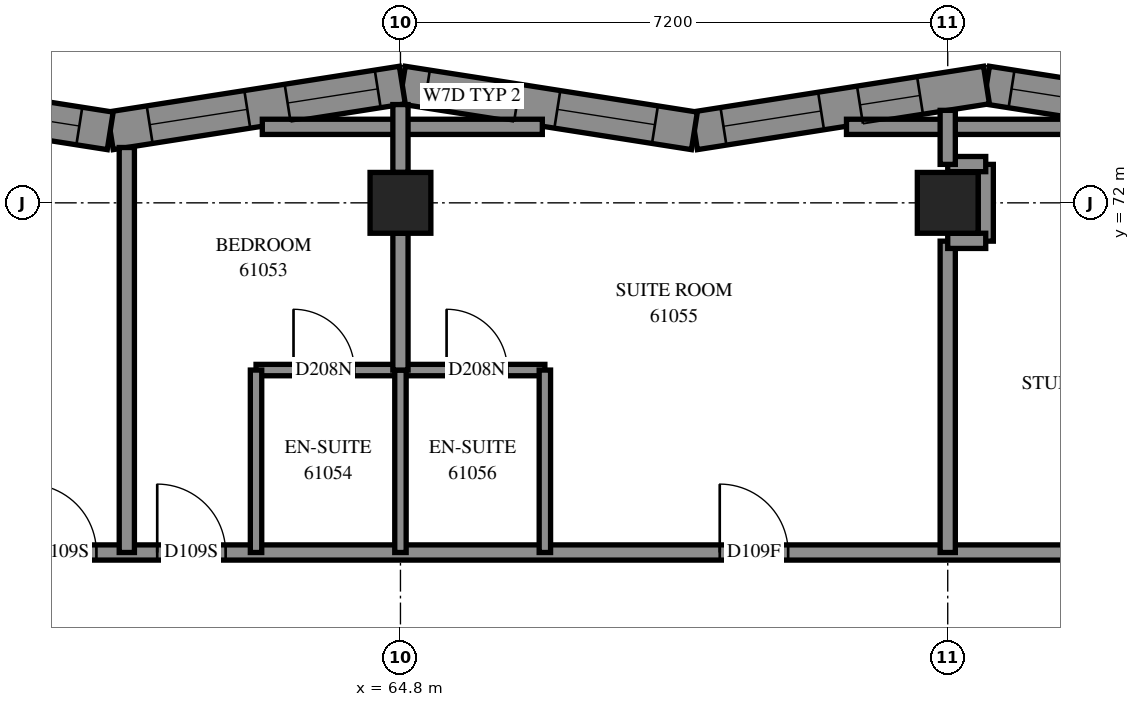
"""IFC4 building model, lengths in metres.
Left out: names, types, materials, properties, quantities, classifications, styles, units other than length and angle.
Written with IfcOpenShell. Run it as: python <this file> out.ifc"""

import sys

from ifc_helpers import new_model, si_unit, direction, frame, frame_2d, origin, origin_2d, place, context, subcontext, project, spatial, polyline, rectangle, outline, extrude, element, fill, save


model = new_model("IFC4")
c1 = context("Model", 3, precision=1e-05, world=origin(), true_north=direction((0.0, 1.0)))
c2 = subcontext(c1, "Body", "Model", "MODEL_VIEW")
j1 = project(units=[si_unit("LENGTHUNIT", "METRE"), si_unit("PLANEANGLEUNIT", "RADIAN")], contexts=[c1])
p1 = place(None, origin())
s1 = spatial("IfcSite", under=j1, at=p1, CompositionType="ELEMENT")
p2 = place(p1, origin())
s2 = spatial("IfcBuilding", under=s1, at=p2, CompositionType="ELEMENT")
p3 = place(p2, frame((0.0, 0.0, 223.6)))
s3 = spatial("IfcBuildingStorey", under=s2, at=p3, CompositionType="ELEMENT", Elevation=223.6)
for number, where, z_axis, x_axis in (
    (1, (64.8, 72.0, 0.0), (0.0, 0.0, 1.0), (1.0, 0.0, 0.0)),
    (2, (72.0, 72.0, 0.0), (0.0, 0.0, 1.0), (1.0, 0.0, 0.0)),
):
    element("IfcColumn", number, at=place(p3, frame(where, z_axis=z_axis, x_axis=x_axis)), inside=s3, PredefinedType="COLUMN", context=c2, shape_type="SweptSolid", body=[
        extrude(rectangle(XDim=0.8, YDim=0.8, at=origin_2d()), origin(), (0.0, 0.0, 1.0), 3.1),
    ])
p4 = place(p3, frame((76.372, 72.944, 0.0), z_axis=(0.0, 0.0, 1.0), x_axis=(-0.9879139197, 0.1550035072, 0.0)))
e3 = element("IfcWall", 3, at=p4, inside=s3, PredefinedType="SOLIDWALL", context=c2, shape_type="SweptSolid", body=[
    extrude(outline(polyline([(0.058, -0.25), (3.948, -0.25), (3.87, 0.25), (-0.058, 0.25), (0.058, -0.25)])), origin(), (0.0, 0.0, 1.0), 3.1),
])
p5 = place(p4, frame((2.375, 0.0, 0.45)))
e4 = element("IfcOpeningElement", 4, at=p5, cuts=e3, PredefinedType="OPENING", context=c2, shape_type="SweptSolid", body=[
    extrude(rectangle(XDim=1.2, YDim=2.5, at=frame_2d((0.6, 1.25))), frame((0.0, 0.26, 0.0), z_axis=(0.0, -1.0, 0.0), x_axis=(1.0, 0.0, 0.0)), (0.0, 0.0, 1.0), 0.52),
])
p6 = place(p3, frame((72.51, 73.55, 0.0), z_axis=(0.0, 0.0, 1.0), x_axis=(-0.9879107269, -0.1550238552, 0.0)))
e5 = element("IfcWall", 5, at=p6, inside=s3, PredefinedType="SOLIDWALL", context=c2, shape_type="SweptSolid", body=[
    extrude(outline(polyline([(-0.039, -0.25), (3.85, -0.25), (3.929, 0.25), (0.039, 0.25), (-0.039, -0.25)])), origin(), (0.0, 0.0, 1.0), 3.1),
])
p7 = place(p6, frame((2.203, 0.0, 0.45)))
e6 = element("IfcOpeningElement", 6, at=p7, cuts=e5, PredefinedType="OPENING", context=c2, shape_type="SweptSolid", body=[
    extrude(rectangle(XDim=1.3, YDim=2.5, at=frame_2d((0.65, 1.25))), frame((0.0, 0.26, 0.0), z_axis=(0.0, -1.0, 0.0), x_axis=(1.0, 0.0, 0.0)), (0.0, 0.0, 1.0), 0.52),
])
p8 = place(p6, frame((0.885, 0.0, 0.45)))
e7 = element("IfcOpeningElement", 7, at=p8, cuts=e5, PredefinedType="OPENING", context=c2, shape_type="SweptSolid", body=[
    extrude(rectangle(XDim=0.8, YDim=2.5, at=frame_2d((0.4, 1.25))), frame((0.0, 0.26, 0.0), z_axis=(0.0, -1.0, 0.0), x_axis=(1.0, 0.0, 0.0)), (0.0, 0.0, 1.0), 0.52),
])
p9 = place(p3, frame((68.667, 72.947, 0.0), z_axis=(0.0, 0.0, 1.0), x_axis=(-0.9879113447, 0.155019918, 0.0)))
e8 = element("IfcWall", 8, at=p9, inside=s3, PredefinedType="SOLIDWALL", context=c2, shape_type="SweptSolid", body=[
    extrude(outline(polyline([(0.039, -0.25), (3.929, -0.25), (3.85, 0.25), (-0.039, 0.25), (0.039, -0.25)])), origin(), (0.0, 0.0, 1.0), 3.1),
])
p10 = place(p9, frame((0.525, 0.0, 0.45)))
e9 = element("IfcOpeningElement", 9, at=p10, cuts=e8, PredefinedType="OPENING", context=c2, shape_type="SweptSolid", body=[
    extrude(rectangle(XDim=1.3, YDim=2.5, at=frame_2d((0.65, 1.25))), frame((0.0, 0.26, 0.0), z_axis=(0.0, -1.0, 0.0), x_axis=(1.0, 0.0, 0.0)), (0.0, 0.0, 1.0), 0.52),
])
p11 = place(p9, frame((2.362, 0.0, 0.5)))
e10 = element("IfcOpeningElement", 10, at=p11, cuts=e8, PredefinedType="OPENING", context=c2, shape_type="SweptSolid", body=[
    extrude(rectangle(XDim=1.2, YDim=2.45, at=frame_2d((0.6, 1.225))), frame((0.0, 0.26, 0.0), z_axis=(0.0, -1.0, 0.0), x_axis=(1.0, 0.0, 0.0)), (0.0, 0.0, 1.0), 0.52),
])
p12 = place(p3, frame((64.824, 73.55, 0.0), z_axis=(0.0, 0.0, 1.0), x_axis=(-0.9879107269, -0.1550238552, 0.0)))
e11 = element("IfcWall", 11, at=p12, inside=s3, PredefinedType="SOLIDWALL", context=c2, shape_type="SweptSolid", body=[
    extrude(outline(polyline([(-0.039, -0.25), (3.85, -0.25), (3.929, 0.25), (0.039, 0.25), (-0.039, -0.25)])), origin(), (0.0, 0.0, 1.0), 3.1),
])
p13 = place(p12, frame((2.064, 0.0, 0.45)))
e12 = element("IfcOpeningElement", 12, at=p13, cuts=e11, PredefinedType="OPENING", context=c2, shape_type="SweptSolid", body=[
    extrude(rectangle(XDim=1.3, YDim=2.5, at=frame_2d((0.65, 1.25))), frame((0.0, 0.26, 0.0), z_axis=(0.0, -1.0, 0.0), x_axis=(1.0, 0.0, 0.0)), (0.0, 0.0, 1.0), 0.52),
])
p14 = place(p12, frame((0.328, 0.0, 0.5)))
e13 = element("IfcOpeningElement", 13, at=p14, cuts=e11, PredefinedType="OPENING", context=c2, shape_type="SweptSolid", body=[
    extrude(rectangle(XDim=1.2, YDim=2.45, at=frame_2d((0.6, 1.225))), frame((0.0, 0.26, 0.0), z_axis=(0.0, -1.0, 0.0), x_axis=(1.0, 0.0, 0.0)), (0.0, 0.0, 1.0), 0.52),
])
p15 = place(p3, frame((60.982, 72.947, 0.0), z_axis=(0.0, 0.0, 1.0), x_axis=(-0.9879113447, 0.155019918, 0.0)))
e14 = element("IfcWall", 14, at=p15, inside=s3, PredefinedType="SOLIDWALL", context=c2, shape_type="SweptSolid", body=[
    extrude(outline(polyline([(0.039, -0.25), (3.929, -0.25), (3.85, 0.25), (-0.039, 0.25), (0.039, -0.25)])), origin(), (0.0, 0.0, 1.0), 3.1),
])
p16 = place(p15, frame((0.411, 0.0, 0.45)))
e15 = element("IfcOpeningElement", 15, at=p16, cuts=e14, PredefinedType="OPENING", context=c2, shape_type="SweptSolid", body=[
    extrude(rectangle(XDim=1.3, YDim=2.5, at=frame_2d((0.65, 1.25))), frame((0.0, 0.26, 0.0), z_axis=(0.0, -1.0, 0.0), x_axis=(1.0, 0.0, 0.0)), (0.0, 0.0, 1.0), 0.52),
])
p17 = place(p15, frame((2.462, 0.0, 0.45)))
e16 = element("IfcOpeningElement", 16, at=p17, cuts=e14, PredefinedType="OPENING", context=c2, shape_type="SweptSolid", body=[
    extrude(rectangle(XDim=0.8, YDim=2.5, at=frame_2d((0.4, 1.25))), frame((0.0, 0.26, 0.0), z_axis=(0.0, -1.0, 0.0), x_axis=(1.0, 0.0, 0.0)), (0.0, 0.0, 1.0), 0.52),
])
p18 = place(p3, frame((55.0, 67.4, 0.0), z_axis=(0.0, 0.0, 1.0), x_axis=(1.0, 0.0, 0.0)))
e17 = element("IfcWall", 17, at=p18, inside=s3, PredefinedType="PARTITIONING", context=c2, shape_type="SweptSolid", body=[
    extrude(rectangle(XDim=19.6, YDim=0.2, at=frame_2d((9.8, 0.0))), origin(), (0.0, 0.0, 1.0), 3.1),
])
p19 = place(p18, frame((4.9, 0.0, 0.0)))
e18 = element("IfcOpeningElement", 18, at=p19, cuts=e17, PredefinedType="OPENING", context=c2, shape_type="SweptSolid", body=[
    extrude(rectangle(XDim=0.9, YDim=2.1, at=frame_2d((0.45, 1.05))), frame((0.0, 0.11, 0.0), z_axis=(0.0, -1.0, 0.0), x_axis=(1.0, 0.0, 0.0)), (0.0, 0.0, 1.0), 0.22),
])
p20 = place(p18, frame((6.6, 0.0, 0.0)))
e19 = element("IfcOpeningElement", 19, at=p20, cuts=e17, PredefinedType="OPENING", context=c2, shape_type="SweptSolid", body=[
    extrude(rectangle(XDim=0.9, YDim=2.1, at=frame_2d((0.45, 1.05))), frame((0.0, 0.11, 0.0), z_axis=(0.0, -1.0, 0.0), x_axis=(1.0, 0.0, 0.0)), (0.0, 0.0, 1.0), 0.22),
])
p21 = place(p18, frame((14.001, 0.0, 0.0)))
e20 = element("IfcOpeningElement", 20, at=p21, cuts=e17, PredefinedType="OPENING", context=c2, shape_type="SweptSolid", body=[
    extrude(rectangle(XDim=0.9, YDim=2.1, at=frame_2d((0.45, 1.05))), frame((0.0, 0.11, 0.0), z_axis=(0.0, -1.0, 0.0), x_axis=(1.0, 0.0, 0.0)), (0.0, 0.0, 1.0), 0.22),
])
p22 = place(p3, frame((61.2, 67.4, 0.0), z_axis=(0.0, 0.0, 1.0), x_axis=(0.0, 1.0, 0.0)))
e21 = element("IfcWall", 21, at=p22, inside=s3, PredefinedType="PARTITIONING", context=c2, shape_type="SweptSolid", body=[
    extrude(rectangle(XDim=5.328, YDim=0.2, at=frame_2d((2.664, 0.0))), origin(), (0.0, 0.0, 1.0), 3.1),
])
p23 = place(p3, frame((72.0, 67.4, 0.0), z_axis=(0.0, 0.0, 1.0), x_axis=(0.0, 1.0, 0.0)))
e22 = element("IfcWall", 22, at=p23, inside=s3, PredefinedType="PARTITIONING", context=c2, shape_type="SweptSolid", body=[
    extrude(rectangle(XDim=4.096, YDim=0.2, at=frame_2d((2.048, 0.0))), origin(), (0.0, 0.0, 1.0), 3.1),
])
p24 = place(p3, frame((62.9, 69.8, 0.0), z_axis=(0.0, 0.0, 1.0), x_axis=(1.0, 0.0, 0.0)))
e23 = element("IfcWall", 23, at=p24, inside=s3, PredefinedType="PARTITIONING", context=c2, shape_type="SweptSolid", body=[
    extrude(rectangle(XDim=3.8, YDim=0.15, at=frame_2d((1.9, 0.0))), origin(), (0.0, 0.0, 1.0), 3.1),
])
p25 = place(p24, frame((0.493, 0.0, 0.0)))
e24 = element("IfcOpeningElement", 24, at=p25, cuts=e23, PredefinedType="OPENING", context=c2, shape_type="SweptSolid", body=[
    extrude(rectangle(XDim=0.8, YDim=2.1, at=frame_2d((0.4, 1.05))), frame((0.0, 0.085, 0.0), z_axis=(0.0, -1.0, 0.0), x_axis=(1.0, 0.0, 0.0)), (0.0, 0.0, 1.0), 0.17),
])
p26 = place(p24, frame((2.507, 0.0, 0.0)))
e25 = element("IfcOpeningElement", 25, at=p26, cuts=e23, PredefinedType="OPENING", context=c2, shape_type="SweptSolid", body=[
    extrude(rectangle(XDim=0.8, YDim=2.1, at=frame_2d((0.4, 1.05))), frame((0.0, 0.085, 0.0), z_axis=(0.0, -1.0, 0.0), x_axis=(1.0, 0.0, 0.0)), (0.0, 0.0, 1.0), 0.17),
])
for number, where, z_axis, x_axis in (
    (26, (70.668, 73.0, 0.0), (0.0, 0.0, 1.0), (1.0, 0.0, 0.0)),
    (27, (62.983, 73.0, 0.0), (0.0, 0.0, 1.0), (1.0, 0.0, 0.0)),
):
    element("IfcWall", number, at=place(p3, frame(where, z_axis=z_axis, x_axis=x_axis)), inside=s3, PredefinedType="PARTITIONING", context=c2, shape_type="SweptSolid", body=[
        extrude(rectangle(XDim=3.684, YDim=0.2, at=frame_2d((1.842, 0.0))), origin(), (0.0, 0.0, 1.0), 3.1),
    ])
for number, where, z_axis, x_axis in (
    (28, (62.9, 67.4, 0.0), (0.0, 0.0, 1.0), (0.0, 1.0, 0.0)),
    (29, (64.8, 67.4, 0.0), (0.0, 0.0, 1.0), (0.0, 1.0, 0.0)),
    (30, (66.7, 67.4, 0.0), (0.0, 0.0, 1.0), (0.0, 1.0, 0.0)),
):
    element("IfcWall", number, at=place(p3, frame(where, z_axis=z_axis, x_axis=x_axis)), inside=s3, PredefinedType="PARTITIONING", context=c2, shape_type="SweptSolid", body=[
        extrude(rectangle(XDim=2.4, YDim=0.15, at=frame_2d((1.2, 0.0))), origin(), (0.0, 0.0, 1.0), 3.1),
    ])
p27 = place(p3, frame((64.8, 69.8, 0.0), z_axis=(0.0, 0.0, 1.0), x_axis=(0.0, 1.0, 0.0)))
e31 = element("IfcWall", 31, at=p27, inside=s3, PredefinedType="PARTITIONING", context=c2, shape_type="SweptSolid", body=[
    extrude(rectangle(XDim=1.8, YDim=0.2, at=frame_2d((0.9, 0.0))), origin(), (0.0, 0.0, 1.0), 3.1),
])
p28 = place(p3, frame((72.5, 71.496, 0.0), z_axis=(0.0, 0.0, 1.0), x_axis=(0.0, 1.0, 0.0)))
e32 = element("IfcWall", 32, at=p28, inside=s3, PredefinedType="PARTITIONING", context=c2, shape_type="SweptSolid", body=[
    extrude(rectangle(XDim=1.01, YDim=0.2, at=frame_2d((0.505, 0.0))), origin(), (0.0, 0.0, 1.0), 3.1),
])
p29 = place(p3, frame((64.8, 72.4, 0.0), z_axis=(0.0, 0.0, 1.0), x_axis=(0.0, 1.0, 0.0)))
e33 = element("IfcWall", 33, at=p29, inside=s3, PredefinedType="PARTITIONING", context=c2, shape_type="SweptSolid", body=[
    extrude(rectangle(XDim=0.893, YDim=0.2, at=frame_2d((0.447, 0.0))), origin(), (0.0, 0.0, 1.0), 3.1),
])
for number, where, z_axis, x_axis in (
    (34, (72.0, 71.5, 0.0), (0.0, 0.0, 1.0), (1.0, 0.0, 0.0)),
    (35, (72.0, 72.51, 0.0), (0.0, 0.0, 1.0), (1.0, 0.0, 0.0)),
):
    element("IfcWall", number, at=place(p3, frame(where, z_axis=z_axis, x_axis=x_axis)), inside=s3, PredefinedType="PARTITIONING", context=c2, shape_type="SweptSolid", body=[
        extrude(rectangle(XDim=0.5, YDim=0.2, at=frame_2d((0.25, 0.0))), origin(), (0.0, 0.0, 1.0), 3.1),
    ])
p30 = place(p3, frame((72.0, 72.506, 0.0), z_axis=(0.0, 0.0, 1.0), x_axis=(0.0, 1.0, 0.0)))
e36 = element("IfcWall", 36, at=p30, inside=s3, PredefinedType="PARTITIONING", context=c2, shape_type="SweptSolid", body=[
    extrude(rectangle(XDim=0.711, YDim=0.2, at=frame_2d((0.355, 0.0))), origin(), (0.0, 0.0, 1.0), 3.1),
])
p31 = place(p5, origin())
e37 = element("IfcWindow", 37, at=p31, inside=s3, PartitioningType="SINGLE_PANEL", PredefinedType="WINDOW", context=c2, shape_type="SweptSolid", body=[
    extrude(rectangle(XDim=1.2, YDim=2.5, at=frame_2d((0.6, 1.25))), frame((0.0, 0.18, 0.0), z_axis=(0.0, -1.0, 0.0), x_axis=(1.0, 0.0, 0.0)), (0.0, 0.0, 1.0), 0.06),
])
fill(e4, e37)
p32 = place(p7, origin())
e38 = element("IfcWindow", 38, at=p32, inside=s3, PartitioningType="SINGLE_PANEL", PredefinedType="WINDOW", context=c2, shape_type="SweptSolid", body=[
    extrude(rectangle(XDim=1.3, YDim=2.5, at=frame_2d((0.65, 1.25))), frame((0.0, 0.18, 0.0), z_axis=(0.0, -1.0, 0.0), x_axis=(1.0, 0.0, 0.0)), (0.0, 0.0, 1.0), 0.06),
])
fill(e6, e38)
p33 = place(p10, origin())
e39 = element("IfcWindow", 39, at=p33, inside=s3, PartitioningType="SINGLE_PANEL", PredefinedType="WINDOW", context=c2, shape_type="SweptSolid", body=[
    extrude(rectangle(XDim=1.3, YDim=2.5, at=frame_2d((0.65, 1.25))), frame((0.0, 0.18, 0.0), z_axis=(0.0, -1.0, 0.0), x_axis=(1.0, 0.0, 0.0)), (0.0, 0.0, 1.0), 0.06),
])
fill(e9, e39)
p34 = place(p13, origin())
e40 = element("IfcWindow", 40, at=p34, inside=s3, PartitioningType="SINGLE_PANEL", PredefinedType="WINDOW", context=c2, shape_type="SweptSolid", body=[
    extrude(rectangle(XDim=1.3, YDim=2.5, at=frame_2d((0.65, 1.25))), frame((0.0, 0.18, 0.0), z_axis=(0.0, -1.0, 0.0), x_axis=(1.0, 0.0, 0.0)), (0.0, 0.0, 1.0), 0.06),
])
fill(e12, e40)
p35 = place(p16, origin())
e41 = element("IfcWindow", 41, at=p35, inside=s3, PartitioningType="SINGLE_PANEL", PredefinedType="WINDOW", context=c2, shape_type="SweptSolid", body=[
    extrude(rectangle(XDim=1.3, YDim=2.5, at=frame_2d((0.65, 1.25))), frame((0.0, 0.18, 0.0), z_axis=(0.0, -1.0, 0.0), x_axis=(1.0, 0.0, 0.0)), (0.0, 0.0, 1.0), 0.06),
])
fill(e15, e41)
p36 = place(p19, origin())
e42 = element("IfcDoor", 42, at=p36, inside=s3, OperationType="SINGLE_SWING_RIGHT", PredefinedType="DOOR", context=c2, shape_type="SweptSolid", body=[
    extrude(rectangle(XDim=0.9, YDim=2.1, at=frame_2d((0.45, 1.05))), frame((0.0, 0.025, 0.0), z_axis=(0.0, -1.0, 0.0), x_axis=(1.0, 0.0, 0.0)), (0.0, 0.0, 1.0), 0.05),
])
fill(e18, e42)
p37 = place(p20, origin())
e43 = element("IfcDoor", 43, at=p37, inside=s3, OperationType="SINGLE_SWING_LEFT", PredefinedType="DOOR", context=c2, shape_type="SweptSolid", body=[
    extrude(rectangle(XDim=0.9, YDim=2.1, at=frame_2d((0.45, 1.05))), frame((0.0, 0.025, 0.0), z_axis=(0.0, -1.0, 0.0), x_axis=(1.0, 0.0, 0.0)), (0.0, 0.0, 1.0), 0.05),
])
fill(e19, e43)
p38 = place(p25, origin())
e44 = element("IfcDoor", 44, at=p38, inside=s3, OperationType="SINGLE_SWING_RIGHT", PredefinedType="DOOR", context=c2, shape_type="SweptSolid", body=[
    extrude(rectangle(XDim=0.8, YDim=2.1, at=frame_2d((0.4, 1.05))), frame((0.0, 0.025, 0.0), z_axis=(0.0, -1.0, 0.0), x_axis=(1.0, 0.0, 0.0)), (0.0, 0.0, 1.0), 0.05),
])
fill(e24, e44)
p39 = place(p21, origin())
e45 = element("IfcDoor", 45, at=p39, inside=s3, OperationType="SINGLE_SWING_RIGHT", PredefinedType="DOOR", context=c2, shape_type="SweptSolid", body=[
    extrude(rectangle(XDim=0.9, YDim=2.1, at=frame_2d((0.45, 1.05))), frame((0.0, 0.025, 0.0), z_axis=(0.0, -1.0, 0.0), x_axis=(1.0, 0.0, 0.0)), (0.0, 0.0, 1.0), 0.05),
])
fill(e20, e45)
p40 = place(p26, origin())
e46 = element("IfcDoor", 46, at=p40, inside=s3, OperationType="SINGLE_SWING_RIGHT", PredefinedType="DOOR", context=c2, shape_type="SweptSolid", body=[
    extrude(rectangle(XDim=0.8, YDim=2.1, at=frame_2d((0.4, 1.05))), frame((0.0, 0.025, 0.0), z_axis=(0.0, -1.0, 0.0), x_axis=(1.0, 0.0, 0.0)), (0.0, 0.0, 1.0), 0.05),
])
fill(e25, e46)
p41 = place(p11, origin())
e47 = element("IfcWindow", 47, at=p41, inside=s3, PartitioningType="SINGLE_PANEL", PredefinedType="WINDOW", context=c2, shape_type="SweptSolid", body=[
    extrude(rectangle(XDim=1.2, YDim=2.45, at=frame_2d((0.6, 1.225))), frame((0.0, 0.18, 0.0), z_axis=(0.0, -1.0, 0.0), x_axis=(1.0, 0.0, 0.0)), (0.0, 0.0, 1.0), 0.06),
])
fill(e10, e47)
p42 = place(p14, origin())
e48 = element("IfcWindow", 48, at=p42, inside=s3, PartitioningType="SINGLE_PANEL", PredefinedType="WINDOW", context=c2, shape_type="SweptSolid", body=[
    extrude(rectangle(XDim=1.2, YDim=2.45, at=frame_2d((0.6, 1.225))), frame((0.0, 0.18, 0.0), z_axis=(0.0, -1.0, 0.0), x_axis=(1.0, 0.0, 0.0)), (0.0, 0.0, 1.0), 0.06),
])
fill(e13, e48)
p43 = place(p8, origin())
e49 = element("IfcWindow", 49, at=p43, inside=s3, PartitioningType="SINGLE_PANEL", PredefinedType="WINDOW", context=c2, shape_type="SweptSolid", body=[
    extrude(rectangle(XDim=0.8, YDim=2.5, at=frame_2d((0.4, 1.25))), frame((0.0, 0.12, 0.0), z_axis=(0.0, -1.0, 0.0), x_axis=(1.0, 0.0, 0.0)), (0.0, 0.0, 1.0), 0.06),
])
fill(e7, e49)
save(model, sys.argv[1])
